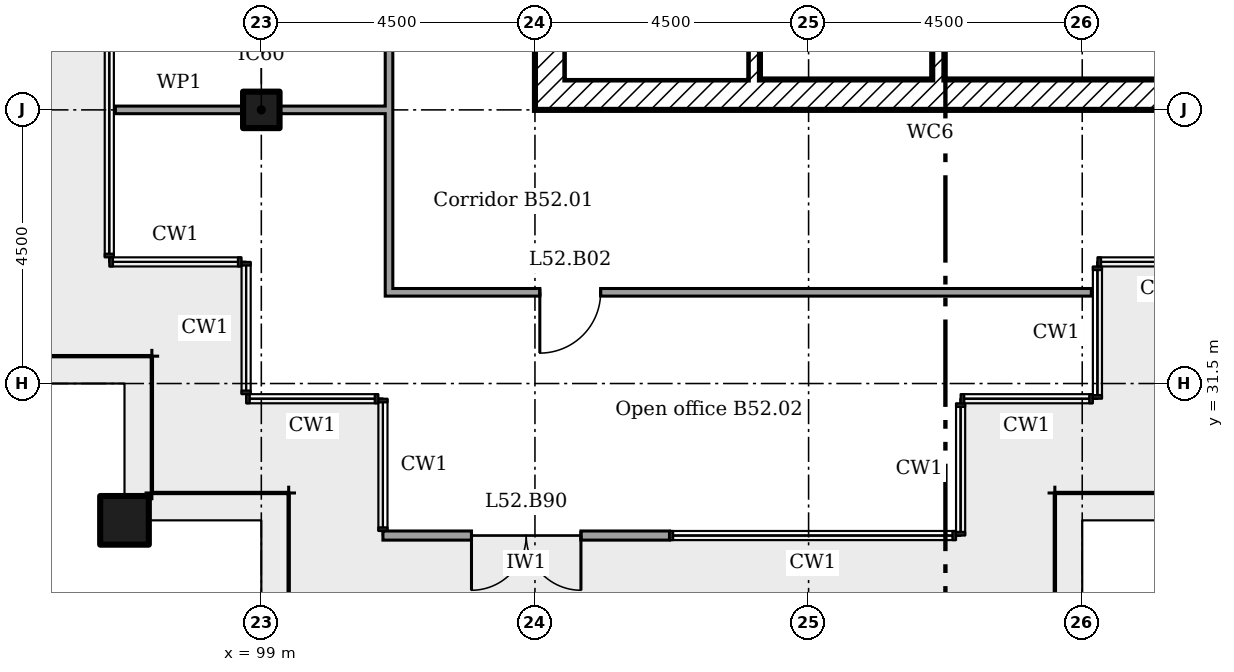
"""IFC4 building model, lengths in metres.
Left out: names, types, materials, properties, quantities, classifications, styles, units other than length and angle.
Written with IfcOpenShell. Run it as: python <this file> out.ifc"""

import sys

from ifc_helpers import new_model, si_unit, direction, frame, frame_2d, origin, origin_2d, place, context, subcontext, project, spatial, rectangle, extrude, element, fill, save


model = new_model("IFC4")
c1 = context("Model", 3, precision=1e-05, world=origin(), true_north=direction((0.0, 1.0)))
c2 = subcontext(c1, "Body", "Model", "MODEL_VIEW")
j1 = project(units=[si_unit("LENGTHUNIT", "METRE"), si_unit("PLANEANGLEUNIT", "RADIAN")], contexts=[c1])
p1 = place(None, origin())
s1 = spatial("IfcSite", under=j1, at=p1, CompositionType="ELEMENT")
p2 = place(p1, origin())
s2 = spatial("IfcBuilding", under=s1, at=p2, CompositionType="ELEMENT")
p3 = place(p2, frame((0.0, 0.0, 206.4)))
s3 = spatial("IfcBuildingStorey", under=s2, at=p3, CompositionType="ELEMENT", Elevation=206.4)
p4 = place(p3, frame((96.75, 29.25, 0.0)))
e1 = element("IfcColumn", 1, at=p4, inside=s3, PredefinedType="COLUMN", context=c2, shape_type="SweptSolid", body=[
    extrude(rectangle(XDim=0.8, YDim=0.8, at=origin_2d()), origin(), (0.0, 0.0, 1.0), 3.6),
])
p5 = place(p3, frame((99.0, 36.0, 0.0)))
e2 = element("IfcColumn", 2, at=p5, inside=s3, PredefinedType="COLUMN", context=c2, shape_type="SweptSolid", body=[
    extrude(rectangle(XDim=0.6, YDim=0.6, at=origin_2d()), origin(), (0.0, 0.0, 1.0), 3.6),
])
p6 = place(p3, frame((101.0, 29.0, 0.0)))
e3 = element("IfcWall", 3, at=p6, inside=s3, PredefinedType="SOLIDWALL", context=c2, shape_type="SweptSolid", body=[
    extrude(rectangle(XDim=4.712, YDim=0.15, at=frame_2d((2.356, 0.0))), origin(), (0.0, 0.0, 1.0), 3.45),
])
p7 = place(p6, frame((1.456, 0.0, 0.0)))
e4 = element("IfcOpeningElement", 4, at=p7, cuts=e3, PredefinedType="OPENING", context=c2, shape_type="SweptSolid", body=[
    extrude(rectangle(XDim=1.8, YDim=2.4, at=frame_2d((0.9, 1.2))), frame((0.0, 0.085, 0.0), z_axis=(0.0, -1.0, 0.0), x_axis=(1.0, 0.0, 0.0)), (0.0, 0.0, 1.0), 0.17),
])
p8 = place(p3, frame((103.5, 36.25, 0.0)))
e5 = element("IfcWall", 5, at=p8, inside=s3, PredefinedType="SHEAR", context=c2, shape_type="SweptSolid", body=[
    extrude(rectangle(XDim=13.0, YDim=0.5, at=frame_2d((6.5, 0.0))), origin(), (0.0, 0.0, 1.0), 3.35),
])
p9 = place(p3, frame((103.75, 36.5, 0.0), z_axis=(0.0, 0.0, 1.0), x_axis=(0.0, 1.0, 0.0)))
e6 = element("IfcWall", 6, at=p9, inside=s3, PredefinedType="SHEAR", context=c2, shape_type="SweptSolid", body=[
    extrude(rectangle(XDim=12.5, YDim=0.5, at=frame_2d((6.25, 0.0))), origin(), (0.0, 0.0, 1.0), 3.35),
])
p10 = place(p9, frame((7.7, 0.0, 0.0)))
e7 = element("IfcOpeningElement", 7, at=p10, cuts=e6, PredefinedType="OPENING", context=c2, shape_type="SweptSolid", body=[
    extrude(rectangle(XDim=1.2, YDim=2.1, at=frame_2d((0.6, 1.05))), frame((0.0, 0.26, 0.0), z_axis=(0.0, -1.0, 0.0), x_axis=(1.0, 0.0, 0.0)), (0.0, 0.0, 1.0), 0.52),
])
p11 = place(p9, frame((5.725, 0.0, 0.0)))
e8 = element("IfcOpeningElement", 8, at=p11, cuts=e6, PredefinedType="OPENING", context=c2, shape_type="SweptSolid", body=[
    extrude(rectangle(XDim=1.0, YDim=2.1, at=frame_2d((0.5, 1.05))), frame((0.0, 0.26, 0.0), z_axis=(0.0, -1.0, 0.0), x_axis=(1.0, 0.0, 0.0)), (0.0, 0.0, 1.0), 0.52),
])
p12 = place(p3, frame((110.133, 36.5, 0.0), z_axis=(0.0, 0.0, 1.0), x_axis=(0.0, 1.0, 0.0)))
e9 = element("IfcWall", 9, at=p12, inside=s3, PredefinedType="SHEAR", context=c2, shape_type="SweptSolid", body=[
    extrude(rectangle(XDim=2.8, YDim=0.2, at=frame_2d((1.4, 0.0))), origin(), (0.0, 0.0, 1.0), 3.35),
])
p13 = place(p3, frame((107.1, 36.5, 0.0), z_axis=(0.0, 0.0, 1.0), x_axis=(0.0, 1.0, 0.0)))
e10 = element("IfcWall", 10, at=p13, inside=s3, PredefinedType="SHEAR", context=c2, shape_type="SweptSolid", body=[
    extrude(rectangle(XDim=7.2, YDim=0.2, at=frame_2d((3.6, 0.0))), origin(), (0.0, 0.0, 1.0), 3.35),
])
p14 = place(p3, frame((101.038, 33.0, 0.0)))
e11 = element("IfcWall", 11, at=p14, inside=s3, PredefinedType="PARTITIONING", context=c2, shape_type="SweptSolid", body=[
    extrude(rectangle(XDim=11.612, YDim=0.125, at=frame_2d((5.806, 0.0))), origin(), (0.0, 0.0, 1.0), 3.45),
])
p15 = place(p14, frame((2.542, 0.0, 0.0)))
e12 = element("IfcOpeningElement", 12, at=p15, cuts=e11, PredefinedType="OPENING", context=c2, shape_type="SweptSolid", body=[
    extrude(rectangle(XDim=1.0, YDim=2.1, at=frame_2d((0.5, 1.05))), frame((0.0, 0.073, 0.0), z_axis=(0.0, -1.0, 0.0), x_axis=(1.0, 0.0, 0.0)), (0.0, 0.0, 1.0), 0.145),
])
p16 = place(p3, frame((96.6, 36.0, 0.0)))
e13 = element("IfcWall", 13, at=p16, inside=s3, PredefinedType="PARTITIONING", context=c2, shape_type="SweptSolid", body=[
    extrude(rectangle(XDim=2.1, YDim=0.125, at=frame_2d((1.05, 0.0))), origin(), (0.0, 0.0, 1.0), 3.45),
])
p17 = place(p3, frame((99.3, 36.0, 0.0)))
e14 = element("IfcWall", 14, at=p17, inside=s3, PredefinedType="PARTITIONING", context=c2, shape_type="SweptSolid", body=[
    extrude(rectangle(XDim=1.8, YDim=0.125, at=frame_2d((0.9, 0.0))), origin(), (0.0, 0.0, 1.0), 3.45),
])
p18 = place(p3, frame((101.1, 33.062, 0.0), z_axis=(0.0, 0.0, 1.0), x_axis=(0.0, 1.0, 0.0)))
e15 = element("IfcWall", 15, at=p18, inside=s3, PredefinedType="PARTITIONING", context=c2, shape_type="SweptSolid", body=[
    extrude(rectangle(XDim=14.975, YDim=0.125, at=frame_2d((7.488, 0.0))), origin(), (0.0, 0.0, 1.0), 3.45),
])
p19 = place(p18, frame((4.688, 0.0, 0.0)))
e16 = element("IfcOpeningElement", 16, at=p19, cuts=e15, PredefinedType="OPENING", context=c2, shape_type="SweptSolid", body=[
    extrude(rectangle(XDim=1.0, YDim=2.1, at=frame_2d((0.5, 1.05))), frame((0.0, 0.073, 0.0), z_axis=(0.0, -1.0, 0.0), x_axis=(1.0, 0.0, 0.0)), (0.0, 0.0, 1.0), 0.145),
])
p20 = place(p18, frame((13.198, 0.0, 0.0)))
e17 = element("IfcOpeningElement", 17, at=p20, cuts=e15, PredefinedType="OPENING", context=c2, shape_type="SweptSolid", body=[
    extrude(rectangle(XDim=1.0, YDim=2.1, at=frame_2d((0.5, 1.05))), frame((0.0, 0.073, 0.0), z_axis=(0.0, -1.0, 0.0), x_axis=(1.0, 0.0, 0.0)), (0.0, 0.0, 1.0), 0.145),
])
p21 = place(p18, frame((9.188, 0.0, 0.0)))
e18 = element("IfcOpeningElement", 18, at=p21, cuts=e15, PredefinedType="OPENING", context=c2, shape_type="SweptSolid", body=[
    extrude(rectangle(XDim=1.0, YDim=2.1, at=frame_2d((0.5, 1.05))), frame((0.0, 0.073, 0.0), z_axis=(0.0, -1.0, 0.0), x_axis=(1.0, 0.0, 0.0)), (0.0, 0.0, 1.0), 0.145),
])
p22 = place(p7, frame((1.8, 0.0, 0.0), x_axis=(-1.0, 0.0, 0.0)))
e19 = element("IfcDoor", 19, at=p22, inside=s3, OperationType="DOUBLE_DOOR_DOUBLE_SWING", PredefinedType="NOTDEFINED", context=c2, shape_type="SweptSolid", body=[
    extrude(rectangle(XDim=1.8, YDim=2.4, at=frame_2d((0.9, 1.2))), frame((0.0, 0.025, 0.0), z_axis=(0.0, -1.0, 0.0), x_axis=(1.0, 0.0, 0.0)), (0.0, 0.0, 1.0), 0.05),
])
fill(e4, e19)
p23 = place(p15, frame((1.0, 0.0, 0.0), x_axis=(-1.0, 0.0, 0.0)))
e20 = element("IfcDoor", 20, at=p23, inside=s3, OperationType="SINGLE_SWING_LEFT", PredefinedType="DOOR", context=c2, shape_type="SweptSolid", body=[
    extrude(rectangle(XDim=1.0, YDim=2.1, at=frame_2d((0.5, 1.05))), frame((0.0, 0.025, 0.0), z_axis=(0.0, -1.0, 0.0), x_axis=(1.0, 0.0, 0.0)), (0.0, 0.0, 1.0), 0.05),
])
fill(e12, e20)
save(model, sys.argv[1])
